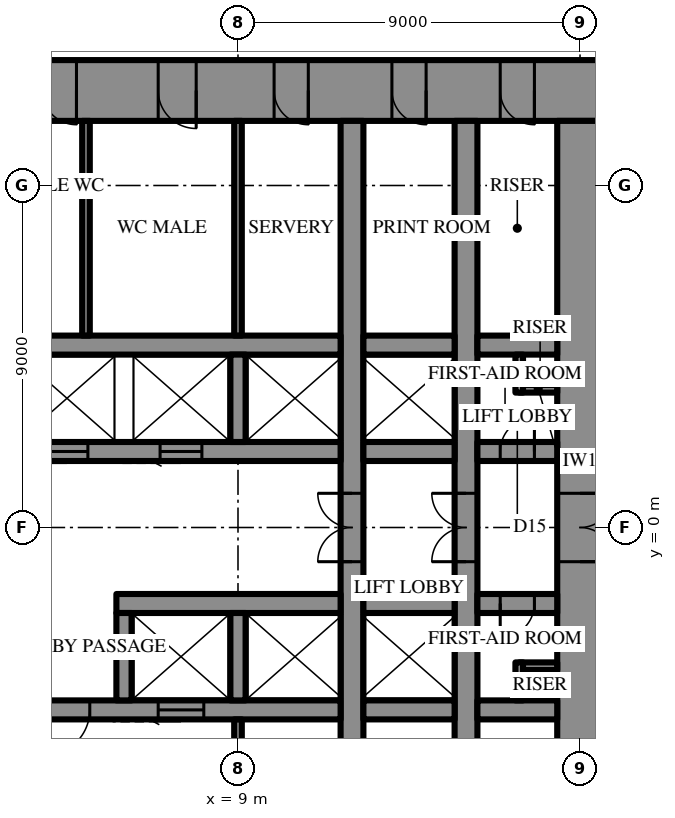
"""IFC4 building model, lengths in metres.
Left out: names, types, materials, properties, quantities, classifications, styles, units other than length and angle.
Written with IfcOpenShell. Run it as: python <this file> out.ifc"""

import sys

from ifc_helpers import new_model, si_unit, direction, frame, frame_2d, origin, place, context, subcontext, project, spatial, rectangle, extrude, element, fill, save


model = new_model("IFC4")
c1 = context("Model", 3, precision=1e-05, world=origin(), true_north=direction((0.0, 1.0)))
c2 = subcontext(c1, "Body", "Model", "MODEL_VIEW")
j1 = project(units=[si_unit("LENGTHUNIT", "METRE"), si_unit("PLANEANGLEUNIT", "RADIAN")], contexts=[c1])
p1 = place(None, origin())
s1 = spatial("IfcSite", under=j1, at=p1, CompositionType="ELEMENT")
p2 = place(p1, origin())
s2 = spatial("IfcBuilding", under=s1, at=p2, CompositionType="ELEMENT")
p3 = place(p2, frame((0.0, 0.0, 140.5)))
s3 = spatial("IfcBuildingStorey", under=s2, at=p3, CompositionType="ELEMENT", Elevation=140.5)
p4 = place(p3, frame((-18.6, 11.5, 0.0), z_axis=(0.0, 0.0, 1.0), x_axis=(1.0, 0.0, 0.0)))
e1 = element("IfcWall", 1, at=p4, inside=s3, PredefinedType="SHEAR", context=c2, shape_type="SweptSolid", body=[
    extrude(rectangle(XDim=37.2, YDim=1.6, at=frame_2d((18.6, 0.0))), origin(), (0.0, 0.0, 1.0), 4.2),
])
p5 = place(p4, frame((19.45, 0.0, 0.0)))
e2 = element("IfcOpeningElement", 2, at=p5, cuts=e1, PredefinedType="OPENING", context=c2, shape_type="SweptSolid", body=[
    extrude(rectangle(XDim=0.9, YDim=2.2, at=frame_2d((0.45, 1.1))), frame((0.0, 0.81, 0.0), z_axis=(0.0, -1.0, 0.0), x_axis=(1.0, 0.0, 0.0)), (0.0, 0.0, 1.0), 1.62),
])
p6 = place(p4, frame((22.45, 0.0, 0.0)))
e3 = element("IfcOpeningElement", 3, at=p6, cuts=e1, PredefinedType="OPENING", context=c2, shape_type="SweptSolid", body=[
    extrude(rectangle(XDim=0.9, YDim=2.2, at=frame_2d((0.45, 1.1))), frame((0.0, 0.81, 0.0), z_axis=(0.0, -1.0, 0.0), x_axis=(1.0, 0.0, 0.0)), (0.0, 0.0, 1.0), 1.62),
])
p7 = place(p4, frame((25.5, 0.0, 0.0)))
e4 = element("IfcOpeningElement", 4, at=p7, cuts=e1, PredefinedType="OPENING", context=c2, shape_type="SweptSolid", body=[
    extrude(rectangle(XDim=1.0, YDim=2.2, at=frame_2d((0.5, 1.1))), frame((0.0, 0.81, 0.0), z_axis=(0.0, -1.0, 0.0), x_axis=(1.0, 0.0, 0.0)), (0.0, 0.0, 1.0), 1.62),
])
p8 = place(p4, frame((1.8, 0.0, 0.0)))
e5 = element("IfcOpeningElement", 5, at=p8, cuts=e1, PredefinedType="OPENING", context=c2, shape_type="SweptSolid", body=[
    extrude(rectangle(XDim=0.9, YDim=2.2, at=frame_2d((0.45, 1.1))), frame((0.0, 0.81, 0.0), z_axis=(0.0, -1.0, 0.0), x_axis=(1.0, 0.0, 0.0)), (0.0, 0.0, 1.0), 1.62),
])
p9 = place(p4, frame((4.65, 0.0, 0.0)))
e6 = element("IfcOpeningElement", 6, at=p9, cuts=e1, PredefinedType="OPENING", context=c2, shape_type="SweptSolid", body=[
    extrude(rectangle(XDim=0.9, YDim=2.2, at=frame_2d((0.45, 1.1))), frame((0.0, 0.81, 0.0), z_axis=(0.0, -1.0, 0.0), x_axis=(1.0, 0.0, 0.0)), (0.0, 0.0, 1.0), 1.62),
])
p10 = place(p4, frame((7.75, 0.0, 0.0)))
e7 = element("IfcOpeningElement", 7, at=p10, cuts=e1, PredefinedType="OPENING", context=c2, shape_type="SweptSolid", body=[
    extrude(rectangle(XDim=0.9, YDim=2.2, at=frame_2d((0.45, 1.1))), frame((0.0, 0.81, 0.0), z_axis=(0.0, -1.0, 0.0), x_axis=(1.0, 0.0, 0.0)), (0.0, 0.0, 1.0), 1.62),
])
p11 = place(p4, frame((28.55, 0.0, 0.0)))
e8 = element("IfcOpeningElement", 8, at=p11, cuts=e1, PredefinedType="OPENING", context=c2, shape_type="SweptSolid", body=[
    extrude(rectangle(XDim=0.9, YDim=2.2, at=frame_2d((0.45, 1.1))), frame((0.0, 0.81, 0.0), z_axis=(0.0, -1.0, 0.0), x_axis=(1.0, 0.0, 0.0)), (0.0, 0.0, 1.0), 1.62),
])
p12 = place(p4, frame((31.65, 0.0, 0.0)))
e9 = element("IfcOpeningElement", 9, at=p12, cuts=e1, PredefinedType="OPENING", context=c2, shape_type="SweptSolid", body=[
    extrude(rectangle(XDim=0.9, YDim=2.2, at=frame_2d((0.45, 1.1))), frame((0.0, 0.81, 0.0), z_axis=(0.0, -1.0, 0.0), x_axis=(1.0, 0.0, 0.0)), (0.0, 0.0, 1.0), 1.62),
])
p13 = place(p4, frame((34.5, 0.0, 0.0)))
e10 = element("IfcOpeningElement", 10, at=p13, cuts=e1, PredefinedType="OPENING", context=c2, shape_type="SweptSolid", body=[
    extrude(rectangle(XDim=0.9, YDim=2.2, at=frame_2d((0.45, 1.1))), frame((0.0, 0.81, 0.0), z_axis=(0.0, -1.0, 0.0), x_axis=(1.0, 0.0, 0.0)), (0.0, 0.0, 1.0), 1.62),
])
p14 = place(p3, frame((18.0, -10.7, 0.0), z_axis=(0.0, 0.0, 1.0), x_axis=(0.0, 1.0, 0.0)))
e11 = element("IfcWall", 11, at=p14, inside=s3, PredefinedType="SHEAR", context=c2, shape_type="SweptSolid", body=[
    extrude(rectangle(XDim=21.4, YDim=1.2, at=frame_2d((10.7, 0.0))), origin(), (0.0, 0.0, 1.0), 4.2),
])
p15 = place(p14, frame((9.8, 0.0, 0.0)))
e12 = element("IfcOpeningElement", 12, at=p15, cuts=e11, PredefinedType="OPENING", context=c2, shape_type="SweptSolid", body=[
    extrude(rectangle(XDim=1.8, YDim=2.4, at=frame_2d((0.9, 1.2))), frame((0.0, 0.61, 0.0), z_axis=(0.0, -1.0, 0.0), x_axis=(1.0, 0.0, 0.0)), (0.0, 0.0, 1.0), 1.22),
])
p16 = place(p3, frame((12.0, -10.7, 0.0), z_axis=(0.0, 0.0, 1.0), x_axis=(0.0, 1.0, 0.0)))
e13 = element("IfcWall", 13, at=p16, inside=s3, PredefinedType="SHEAR", context=c2, shape_type="SweptSolid", body=[
    extrude(rectangle(XDim=21.4, YDim=0.6, at=frame_2d((10.7, 0.0))), origin(), (0.0, 0.0, 1.0), 4.2),
])
p17 = place(p16, frame((9.8, 0.0, 0.0)))
e14 = element("IfcOpeningElement", 14, at=p17, cuts=e13, PredefinedType="OPENING", context=c2, shape_type="SweptSolid", body=[
    extrude(rectangle(XDim=1.8, YDim=2.4, at=frame_2d((0.9, 1.2))), frame((0.0, 0.31, 0.0), z_axis=(0.0, -1.0, 0.0), x_axis=(1.0, 0.0, 0.0)), (0.0, 0.0, 1.0), 0.62),
])
p18 = place(p3, frame((15.0, -10.7, 0.0), z_axis=(0.0, 0.0, 1.0), x_axis=(0.0, 1.0, 0.0)))
e15 = element("IfcWall", 15, at=p18, inside=s3, PredefinedType="SHEAR", context=c2, shape_type="SweptSolid", body=[
    extrude(rectangle(XDim=21.4, YDim=0.6, at=frame_2d((10.7, 0.0))), origin(), (0.0, 0.0, 1.0), 4.2),
])
p19 = place(p18, frame((9.8, 0.0, 0.0)))
e16 = element("IfcOpeningElement", 16, at=p19, cuts=e15, PredefinedType="OPENING", context=c2, shape_type="SweptSolid", body=[
    extrude(rectangle(XDim=1.8, YDim=2.4, at=frame_2d((0.9, 1.2))), frame((0.0, 0.31, 0.0), z_axis=(0.0, -1.0, 0.0), x_axis=(1.0, 0.0, 0.0)), (0.0, 0.0, 1.0), 0.62),
])
p20 = place(p3, frame((-3.2, 2.0, 0.0), z_axis=(0.0, 0.0, 1.0), x_axis=(1.0, 0.0, 0.0)))
e17 = element("IfcWall", 17, at=p20, inside=s3, PredefinedType="SHEAR", context=c2, shape_type="SweptSolid", body=[
    extrude(rectangle(XDim=14.9, YDim=0.5, at=frame_2d((7.45, 0.0))), origin(), (0.0, 0.0, 1.0), 4.2),
])
p21 = place(p20, frame((1.15, 0.0, 0.0)))
e18 = element("IfcOpeningElement", 18, at=p21, cuts=e17, PredefinedType="OPENING", context=c2, shape_type="SweptSolid", body=[
    extrude(rectangle(XDim=1.1, YDim=2.2, at=frame_2d((0.55, 1.1))), frame((0.0, 0.26, 0.0), z_axis=(0.0, -1.0, 0.0), x_axis=(1.0, 0.0, 0.0)), (0.0, 0.0, 1.0), 0.52),
])
p22 = place(p20, frame((4.15, 0.0, 0.0)))
e19 = element("IfcOpeningElement", 19, at=p22, cuts=e17, PredefinedType="OPENING", context=c2, shape_type="SweptSolid", body=[
    extrude(rectangle(XDim=1.1, YDim=2.2, at=frame_2d((0.55, 1.1))), frame((0.0, 0.26, 0.0), z_axis=(0.0, -1.0, 0.0), x_axis=(1.0, 0.0, 0.0)), (0.0, 0.0, 1.0), 0.52),
])
p23 = place(p20, frame((7.15, 0.0, 0.0)))
e20 = element("IfcOpeningElement", 20, at=p23, cuts=e17, PredefinedType="OPENING", context=c2, shape_type="SweptSolid", body=[
    extrude(rectangle(XDim=1.1, YDim=2.2, at=frame_2d((0.55, 1.1))), frame((0.0, 0.26, 0.0), z_axis=(0.0, -1.0, 0.0), x_axis=(1.0, 0.0, 0.0)), (0.0, 0.0, 1.0), 0.52),
])
p24 = place(p20, frame((10.15, 0.0, 0.0)))
e21 = element("IfcOpeningElement", 21, at=p24, cuts=e17, PredefinedType="OPENING", context=c2, shape_type="SweptSolid", body=[
    extrude(rectangle(XDim=1.1, YDim=2.2, at=frame_2d((0.55, 1.1))), frame((0.0, 0.26, 0.0), z_axis=(0.0, -1.0, 0.0), x_axis=(1.0, 0.0, 0.0)), (0.0, 0.0, 1.0), 0.52),
])
p25 = place(p3, frame((12.3, 2.0, 0.0), z_axis=(0.0, 0.0, 1.0), x_axis=(1.0, 0.0, 0.0)))
e22 = element("IfcWall", 22, at=p25, inside=s3, PredefinedType="SHEAR", context=c2, shape_type="SweptSolid", body=[
    extrude(rectangle(XDim=2.4, YDim=0.5, at=frame_2d((1.2, 0.0))), origin(), (0.0, 0.0, 1.0), 4.2),
])
p26 = place(p3, frame((15.3, 2.0, 0.0), z_axis=(0.0, 0.0, 1.0), x_axis=(1.0, 0.0, 0.0)))
e23 = element("IfcWall", 23, at=p26, inside=s3, PredefinedType="SHEAR", context=c2, shape_type="SweptSolid", body=[
    extrude(rectangle(XDim=2.1, YDim=0.5, at=frame_2d((1.05, 0.0))), origin(), (0.0, 0.0, 1.0), 4.2),
])
p27 = place(p26, frame((0.6, 0.0, 0.0)))
e24 = element("IfcOpeningElement", 24, at=p27, cuts=e23, PredefinedType="OPENING", context=c2, shape_type="SweptSolid", body=[
    extrude(rectangle(XDim=0.9, YDim=2.2, at=frame_2d((0.45, 1.1))), frame((0.0, 0.26, 0.0), z_axis=(0.0, -1.0, 0.0), x_axis=(1.0, 0.0, 0.0)), (0.0, 0.0, 1.0), 0.52),
])
p28 = place(p3, frame((-11.7, 4.8, 0.0), z_axis=(0.0, 0.0, 1.0), x_axis=(1.0, 0.0, 0.0)))
e25 = element("IfcWall", 25, at=p28, inside=s3, PredefinedType="SHEAR", context=c2, shape_type="SweptSolid", body=[
    extrude(rectangle(XDim=23.4, YDim=0.5, at=frame_2d((11.7, 0.0))), origin(), (0.0, 0.0, 1.0), 4.2),
])
p29 = place(p28, frame((6.6, 0.0, 0.0)))
e26 = element("IfcOpeningElement", 26, at=p29, cuts=e25, PredefinedType="OPENING", context=c2, shape_type="SweptSolid", body=[
    extrude(rectangle(XDim=1.2, YDim=2.2, at=frame_2d((0.6, 1.1))), frame((0.0, 0.26, 0.0), z_axis=(0.0, -1.0, 0.0), x_axis=(1.0, 0.0, 0.0)), (0.0, 0.0, 1.0), 0.52),
])
p30 = place(p28, frame((3.6, 0.0, 0.0)))
e27 = element("IfcOpeningElement", 27, at=p30, cuts=e25, PredefinedType="OPENING", context=c2, shape_type="SweptSolid", body=[
    extrude(rectangle(XDim=1.2, YDim=2.2, at=frame_2d((0.6, 1.1))), frame((0.0, 0.26, 0.0), z_axis=(0.0, -1.0, 0.0), x_axis=(1.0, 0.0, 0.0)), (0.0, 0.0, 1.0), 0.52),
])
p31 = place(p3, frame((12.3, 4.8, 0.0), z_axis=(0.0, 0.0, 1.0), x_axis=(1.0, 0.0, 0.0)))
e28 = element("IfcWall", 28, at=p31, inside=s3, PredefinedType="SHEAR", context=c2, shape_type="SweptSolid", body=[
    extrude(rectangle(XDim=2.4, YDim=0.5, at=frame_2d((1.2, 0.0))), origin(), (0.0, 0.0, 1.0), 4.2),
])
p32 = place(p3, frame((15.3, 4.8, 0.0), z_axis=(0.0, 0.0, 1.0), x_axis=(1.0, 0.0, 0.0)))
e29 = element("IfcWall", 29, at=p32, inside=s3, PredefinedType="SHEAR", context=c2, shape_type="SweptSolid", body=[
    extrude(rectangle(XDim=2.1, YDim=0.5, at=frame_2d((1.05, 0.0))), origin(), (0.0, 0.0, 1.0), 4.2),
])
p33 = place(p3, frame((9.0, 2.25, 0.0), z_axis=(0.0, 0.0, 1.0), x_axis=(0.0, 1.0, 0.0)))
e30 = element("IfcWall", 30, at=p33, inside=s3, PredefinedType="SHEAR", context=c2, shape_type="SweptSolid", body=[
    extrude(rectangle(XDim=2.3, YDim=0.4, at=frame_2d((1.15, 0.0))), origin(), (0.0, 0.0, 1.0), 4.2),
])
p34 = place(p3, frame((17.4, -2.0, 0.0), z_axis=(0.0, 0.0, 1.0), x_axis=(-1.0, 0.0, 0.0)))
e31 = element("IfcWall", 31, at=p34, inside=s3, PredefinedType="SHEAR", context=c2, shape_type="SweptSolid", body=[
    extrude(rectangle(XDim=2.1, YDim=0.5, at=frame_2d((1.05, 0.0))), origin(), (0.0, 0.0, 1.0), 4.2),
])
p35 = place(p34, frame((0.6, 0.0, 0.0)))
e32 = element("IfcOpeningElement", 32, at=p35, cuts=e31, PredefinedType="OPENING", context=c2, shape_type="SweptSolid", body=[
    extrude(rectangle(XDim=0.9, YDim=2.2, at=frame_2d((0.45, 1.1))), frame((0.0, 0.26, 0.0), z_axis=(0.0, -1.0, 0.0), x_axis=(1.0, 0.0, 0.0)), (0.0, 0.0, 1.0), 0.52),
])
p36 = place(p3, frame((14.7, -2.0, 0.0), z_axis=(0.0, 0.0, 1.0), x_axis=(-1.0, 0.0, 0.0)))
e33 = element("IfcWall", 33, at=p36, inside=s3, PredefinedType="SHEAR", context=c2, shape_type="SweptSolid", body=[
    extrude(rectangle(XDim=2.4, YDim=0.5, at=frame_2d((1.2, 0.0))), origin(), (0.0, 0.0, 1.0), 4.2),
])
p37 = place(p3, frame((11.7, -2.0, 0.0), z_axis=(0.0, 0.0, 1.0), x_axis=(-1.0, 0.0, 0.0)))
e34 = element("IfcWall", 34, at=p37, inside=s3, PredefinedType="SHEAR", context=c2, shape_type="SweptSolid", body=[
    extrude(rectangle(XDim=5.9, YDim=0.5, at=frame_2d((2.95, 0.0))), origin(), (0.0, 0.0, 1.0), 4.2),
])
p38 = place(p3, frame((17.4, -4.8, 0.0), z_axis=(0.0, 0.0, 1.0), x_axis=(-1.0, 0.0, 0.0)))
e35 = element("IfcWall", 35, at=p38, inside=s3, PredefinedType="SHEAR", context=c2, shape_type="SweptSolid", body=[
    extrude(rectangle(XDim=2.1, YDim=0.5, at=frame_2d((1.05, 0.0))), origin(), (0.0, 0.0, 1.0), 4.2),
])
p39 = place(p3, frame((14.7, -4.8, 0.0), z_axis=(0.0, 0.0, 1.0), x_axis=(-1.0, 0.0, 0.0)))
e36 = element("IfcWall", 36, at=p39, inside=s3, PredefinedType="SHEAR", context=c2, shape_type="SweptSolid", body=[
    extrude(rectangle(XDim=2.4, YDim=0.5, at=frame_2d((1.2, 0.0))), origin(), (0.0, 0.0, 1.0), 4.2),
])
p40 = place(p3, frame((11.7, -4.8, 0.0), z_axis=(0.0, 0.0, 1.0), x_axis=(-1.0, 0.0, 0.0)))
e37 = element("IfcWall", 37, at=p40, inside=s3, PredefinedType="SHEAR", context=c2, shape_type="SweptSolid", body=[
    extrude(rectangle(XDim=23.4, YDim=0.5, at=frame_2d((11.7, 0.0))), origin(), (0.0, 0.0, 1.0), 4.2),
])
p41 = place(p40, frame((6.6, 0.0, 0.0)))
e38 = element("IfcOpeningElement", 38, at=p41, cuts=e37, PredefinedType="OPENING", context=c2, shape_type="SweptSolid", body=[
    extrude(rectangle(XDim=1.2, YDim=2.2, at=frame_2d((0.6, 1.1))), frame((0.0, 0.26, 0.0), z_axis=(0.0, -1.0, 0.0), x_axis=(1.0, 0.0, 0.0)), (0.0, 0.0, 1.0), 0.52),
])
p42 = place(p40, frame((3.6, 0.0, 0.0)))
e39 = element("IfcOpeningElement", 39, at=p42, cuts=e37, PredefinedType="OPENING", context=c2, shape_type="SweptSolid", body=[
    extrude(rectangle(XDim=1.2, YDim=2.2, at=frame_2d((0.6, 1.1))), frame((0.0, 0.26, 0.0), z_axis=(0.0, -1.0, 0.0), x_axis=(1.0, 0.0, 0.0)), (0.0, 0.0, 1.0), 0.52),
])
for number, where, z_axis, x_axis in (
    (40, (9.0, -2.25, 0.0), (0.0, 0.0, 1.0), (0.0, -1.0, 0.0)),
    (41, (6.0, -2.25, 0.0), (0.0, 0.0, 1.0), (0.0, -1.0, 0.0)),
):
    element("IfcWall", number, at=place(p3, frame(where, z_axis=z_axis, x_axis=x_axis)), inside=s3, PredefinedType="SHEAR", context=c2, shape_type="SweptSolid", body=[
        extrude(rectangle(XDim=2.3, YDim=0.4, at=frame_2d((1.15, 0.0))), origin(), (0.0, 0.0, 1.0), 4.2),
    ])
for number, where, z_axis, x_axis in (
    (42, (9.0, 5.05, 0.0), (0.0, 0.0, 1.0), (0.0, 1.0, 0.0)),
    (43, (5.0, 5.05, 0.0), (0.0, 0.0, 1.0), (0.0, 1.0, 0.0)),
    (44, (9.0, -5.05, 0.0), (0.0, 0.0, 1.0), (0.0, -1.0, 0.0)),
):
    element("IfcWall", number, at=place(p3, frame(where, z_axis=z_axis, x_axis=x_axis)), inside=s3, PredefinedType="PARTITIONING", context=c2, shape_type="SweptSolid", body=[
        extrude(rectangle(XDim=5.65, YDim=0.2, at=frame_2d((2.825, 0.0))), origin(), (0.0, 0.0, 1.0), 4.0),
    ])
for number, where, z_axis, x_axis in (
    (45, (16.4, 3.65, 0.0), (0.0, 0.0, 1.0), (1.0, 0.0, 0.0)),
    (46, (16.4, 3.55, 0.0), (0.0, 0.0, 1.0), (0.0, 1.0, 0.0)),
    (47, (17.4, -3.65, 0.0), (0.0, 0.0, 1.0), (-1.0, 0.0, 0.0)),
    (48, (16.4, -3.55, 0.0), (0.0, 0.0, 1.0), (0.0, -1.0, 0.0)),
):
    element("IfcWall", number, at=place(p3, frame(where, z_axis=z_axis, x_axis=x_axis)), inside=s3, PredefinedType="PARTITIONING", context=c2, shape_type="SweptSolid", body=[
        extrude(rectangle(XDim=1.0, YDim=0.2, at=frame_2d((0.5, 0.0))), origin(), (0.0, 0.0, 1.0), 4.0),
    ])
p43 = place(p15, frame((1.8, 0.0, 0.0), z_axis=(0.0, 0.0, 1.0), x_axis=(-1.0, 0.0, 0.0)))
e49 = element("IfcDoor", 49, at=p43, inside=s3, OperationType="DOUBLE_DOOR_SINGLE_SWING", PredefinedType="DOOR", context=c2, shape_type="SweptSolid", body=[
    extrude(rectangle(XDim=1.8, YDim=2.4, at=frame_2d((0.9, 1.2))), frame((0.0, 0.025, 0.0), z_axis=(0.0, -1.0, 0.0), x_axis=(1.0, 0.0, 0.0)), (0.0, 0.0, 1.0), 0.05),
])
fill(e12, e49)
p44 = place(p6, frame((0.9, 0.0, 0.0), z_axis=(0.0, 0.0, 1.0), x_axis=(-1.0, 0.0, 0.0)))
e50 = element("IfcDoor", 50, at=p44, inside=s3, OperationType="SINGLE_SWING_RIGHT", PredefinedType="DOOR", context=c2, shape_type="SweptSolid", body=[
    extrude(rectangle(XDim=0.9, YDim=2.2, at=frame_2d((0.45, 1.1))), frame((0.0, 0.025, 0.0), z_axis=(0.0, -1.0, 0.0), x_axis=(1.0, 0.0, 0.0)), (0.0, 0.0, 1.0), 0.05),
])
fill(e3, e50)
p45 = place(p7, frame((1.0, 0.0, 0.0), z_axis=(0.0, 0.0, 1.0), x_axis=(-1.0, 0.0, 0.0)))
e51 = element("IfcDoor", 51, at=p45, inside=s3, OperationType="SINGLE_SWING_RIGHT", PredefinedType="DOOR", context=c2, shape_type="SweptSolid", body=[
    extrude(rectangle(XDim=1.0, YDim=2.2, at=frame_2d((0.5, 1.1))), frame((0.0, 0.025, 0.0), z_axis=(0.0, -1.0, 0.0), x_axis=(1.0, 0.0, 0.0)), (0.0, 0.0, 1.0), 0.05),
])
fill(e4, e51)
p46 = place(p11, frame((0.9, 0.0, 0.0), z_axis=(0.0, 0.0, 1.0), x_axis=(-1.0, 0.0, 0.0)))
e52 = element("IfcDoor", 52, at=p46, inside=s3, OperationType="SINGLE_SWING_RIGHT", PredefinedType="DOOR", context=c2, shape_type="SweptSolid", body=[
    extrude(rectangle(XDim=0.9, YDim=2.2, at=frame_2d((0.45, 1.1))), frame((0.0, 0.025, 0.0), z_axis=(0.0, -1.0, 0.0), x_axis=(1.0, 0.0, 0.0)), (0.0, 0.0, 1.0), 0.05),
])
fill(e8, e52)
p47 = place(p12, frame((0.9, 0.0, 0.0), z_axis=(0.0, 0.0, 1.0), x_axis=(-1.0, 0.0, 0.0)))
e53 = element("IfcDoor", 53, at=p47, inside=s3, OperationType="SINGLE_SWING_RIGHT", PredefinedType="DOOR", context=c2, shape_type="SweptSolid", body=[
    extrude(rectangle(XDim=0.9, YDim=2.2, at=frame_2d((0.45, 1.1))), frame((0.0, 0.025, 0.0), z_axis=(0.0, -1.0, 0.0), x_axis=(1.0, 0.0, 0.0)), (0.0, 0.0, 1.0), 0.05),
])
fill(e9, e53)
p48 = place(p13, frame((0.9, 0.0, 0.0), z_axis=(0.0, 0.0, 1.0), x_axis=(-1.0, 0.0, 0.0)))
e54 = element("IfcDoor", 54, at=p48, inside=s3, OperationType="SINGLE_SWING_RIGHT", PredefinedType="DOOR", context=c2, shape_type="SweptSolid", body=[
    extrude(rectangle(XDim=0.9, YDim=2.2, at=frame_2d((0.45, 1.1))), frame((0.0, 0.025, 0.0), z_axis=(0.0, -1.0, 0.0), x_axis=(1.0, 0.0, 0.0)), (0.0, 0.0, 1.0), 0.05),
])
fill(e10, e54)
p49 = place(p41, origin())
e55 = element("IfcDoor", 55, at=p49, inside=s3, OperationType="SINGLE_SWING_LEFT", PredefinedType="DOOR", context=c2, shape_type="SweptSolid", body=[
    extrude(rectangle(XDim=1.2, YDim=2.2, at=frame_2d((0.6, 1.1))), frame((0.0, 0.025, 0.0), z_axis=(0.0, -1.0, 0.0), x_axis=(1.0, 0.0, 0.0)), (0.0, 0.0, 1.0), 0.05),
])
fill(e38, e55)
p50 = place(p27, origin())
e56 = element("IfcDoor", 56, at=p50, inside=s3, OperationType="SINGLE_SWING_LEFT", PredefinedType="DOOR", context=c2, shape_type="SweptSolid", body=[
    extrude(rectangle(XDim=0.9, YDim=2.2, at=frame_2d((0.45, 1.1))), frame((0.0, 0.025, 0.0), z_axis=(0.0, -1.0, 0.0), x_axis=(1.0, 0.0, 0.0)), (0.0, 0.0, 1.0), 0.05),
])
fill(e24, e56)
p51 = place(p35, origin())
e57 = element("IfcDoor", 57, at=p51, inside=s3, OperationType="SINGLE_SWING_LEFT", PredefinedType="DOOR", context=c2, shape_type="SweptSolid", body=[
    extrude(rectangle(XDim=0.9, YDim=2.2, at=frame_2d((0.45, 1.1))), frame((0.0, 0.025, 0.0), z_axis=(0.0, -1.0, 0.0), x_axis=(1.0, 0.0, 0.0)), (0.0, 0.0, 1.0), 0.05),
])
fill(e32, e57)
p52 = place(p17, origin())
e58 = element("IfcDoor", 58, at=p52, inside=s3, OperationType="DOUBLE_DOOR_SINGLE_SWING", PredefinedType="DOOR", context=c2, shape_type="SweptSolid", body=[
    extrude(rectangle(XDim=1.8, YDim=2.4, at=frame_2d((0.9, 1.2))), frame((0.0, 0.025, 0.0), z_axis=(0.0, -1.0, 0.0), x_axis=(1.0, 0.0, 0.0)), (0.0, 0.0, 1.0), 0.05),
])
fill(e14, e58)
p53 = place(p19, origin())
e59 = element("IfcDoor", 59, at=p53, inside=s3, OperationType="DOUBLE_DOOR_SINGLE_SWING", PredefinedType="DOOR", context=c2, shape_type="SweptSolid", body=[
    extrude(rectangle(XDim=1.8, YDim=2.4, at=frame_2d((0.9, 1.2))), frame((0.0, 0.025, 0.0), z_axis=(0.0, -1.0, 0.0), x_axis=(1.0, 0.0, 0.0)), (0.0, 0.0, 1.0), 0.05),
])
fill(e16, e59)
p54 = place(p23, frame((1.1, 0.0, 0.0), z_axis=(0.0, 0.0, 1.0), x_axis=(-1.0, 0.0, 0.0)))
e60 = element("IfcDoor", 60, at=p54, inside=s3, OperationType="SLIDING_TO_LEFT", PredefinedType="DOOR", context=c2, shape_type="SweptSolid", body=[
    extrude(rectangle(XDim=1.1, YDim=2.2, at=frame_2d((0.55, 1.1))), frame((0.0, 0.025, 0.0), z_axis=(0.0, -1.0, 0.0), x_axis=(1.0, 0.0, 0.0)), (0.0, 0.0, 1.0), 0.05),
])
fill(e20, e60)
p55 = place(p24, frame((1.1, 0.0, 0.0), z_axis=(0.0, 0.0, 1.0), x_axis=(-1.0, 0.0, 0.0)))
e61 = element("IfcDoor", 61, at=p55, inside=s3, OperationType="SLIDING_TO_LEFT", PredefinedType="DOOR", context=c2, shape_type="SweptSolid", body=[
    extrude(rectangle(XDim=1.1, YDim=2.2, at=frame_2d((0.55, 1.1))), frame((0.0, 0.025, 0.0), z_axis=(0.0, -1.0, 0.0), x_axis=(1.0, 0.0, 0.0)), (0.0, 0.0, 1.0), 0.05),
])
fill(e21, e61)
p56 = place(p42, origin())
e62 = element("IfcDoor", 62, at=p56, inside=s3, OperationType="SLIDING_TO_LEFT", PredefinedType="DOOR", context=c2, shape_type="SweptSolid", body=[
    extrude(rectangle(XDim=1.2, YDim=2.2, at=frame_2d((0.6, 1.1))), frame((0.0, 0.025, 0.0), z_axis=(0.0, -1.0, 0.0), x_axis=(1.0, 0.0, 0.0)), (0.0, 0.0, 1.0), 0.05),
])
fill(e39, e62)
save(model, sys.argv[1])
